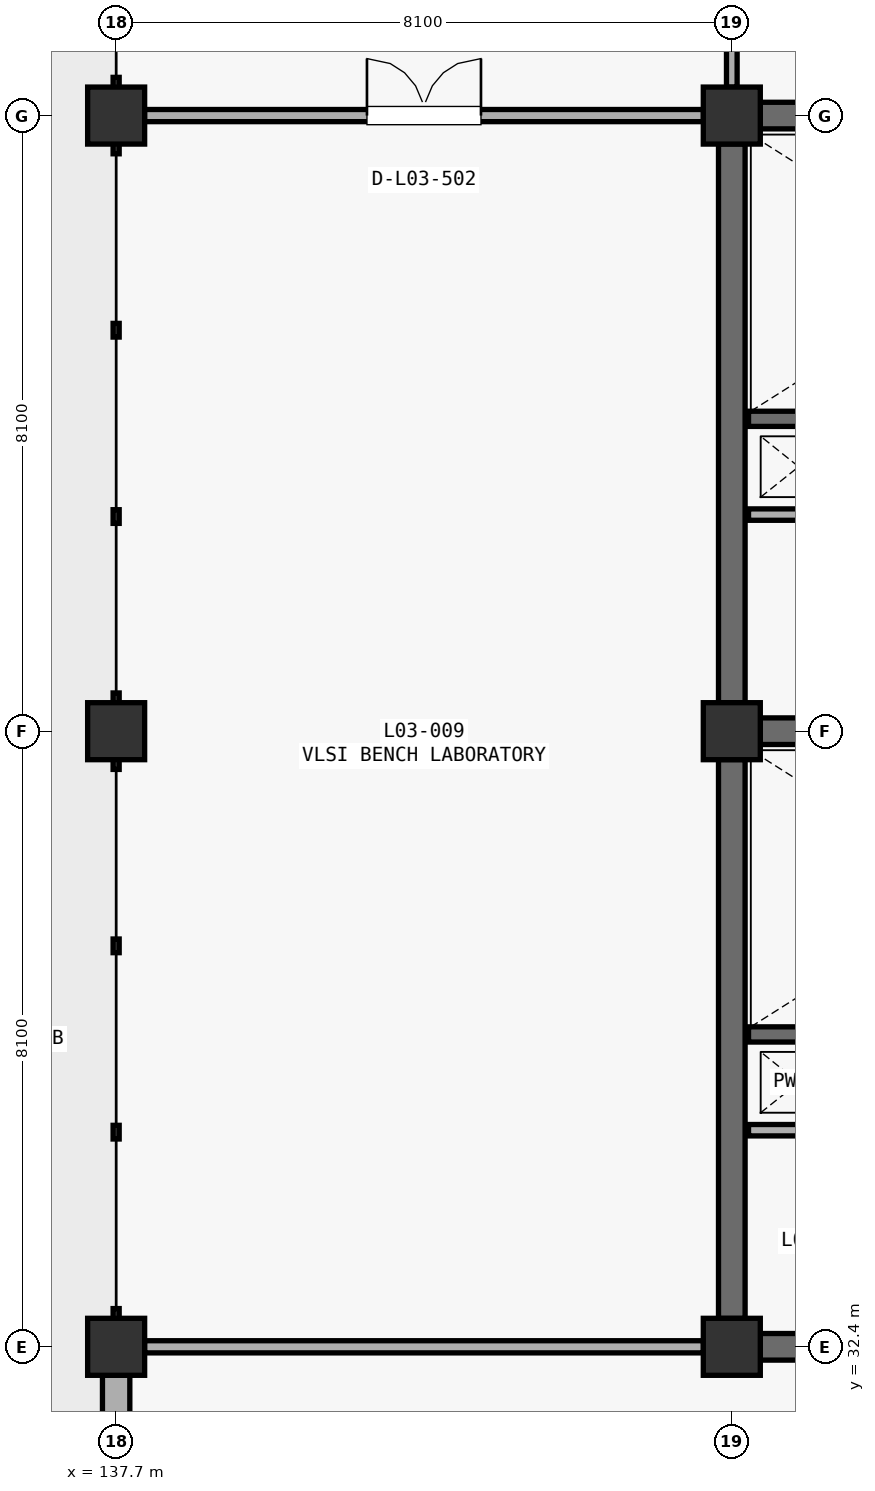
"""IFC4 building model, lengths in metres.
Left out: names, types, materials, properties, quantities, classifications, styles, units other than length and angle.
Written with IfcOpenShell. Run it as: python <this file> out.ifc"""

import sys

from ifc_helpers import new_model, si_unit, direction, frame, frame_2d, origin, origin_2d, place, context, subcontext, project, spatial, rectangle, extrude, element, fill, save


model = new_model("IFC4")
c1 = context("Model", 3, precision=1e-05, world=origin(), true_north=direction((0.0, 1.0)))
c2 = subcontext(c1, "Body", "Model", "MODEL_VIEW")
j1 = project(units=[si_unit("LENGTHUNIT", "METRE"), si_unit("PLANEANGLEUNIT", "RADIAN")], contexts=[c1])
p1 = place(None, origin())
s1 = spatial("IfcSite", under=j1, at=p1, CompositionType="ELEMENT")
p2 = place(p1, origin())
s2 = spatial("IfcBuilding", under=s1, at=p2, CompositionType="ELEMENT")
p3 = place(p2, frame((0.0, 0.0, 14.11)))
s3 = spatial("IfcBuildingStorey", under=s2, at=p3, CompositionType="ELEMENT", Elevation=14.11)
for number, where, z_axis, x_axis in (
    (1, (137.7, 32.4, 0.0), (0.0, 0.0, 1.0), (1.0, 0.0, 0.0)),
    (2, (137.7, 40.5, 0.0), (0.0, 0.0, 1.0), (1.0, 0.0, 0.0)),
    (3, (137.7, 48.6, 0.0), (0.0, 0.0, 1.0), (1.0, 0.0, 0.0)),
    (4, (145.8, 32.4, 0.0), (0.0, 0.0, 1.0), (1.0, 0.0, 0.0)),
    (5, (145.8, 40.5, 0.0), (0.0, 0.0, 1.0), (1.0, 0.0, 0.0)),
    (6, (145.8, 48.6, 0.0), (0.0, 0.0, 1.0), (1.0, 0.0, 0.0)),
):
    element("IfcColumn", number, at=place(p3, frame(where, z_axis=z_axis, x_axis=x_axis)), inside=s3, PredefinedType="COLUMN", context=c2, shape_type="SweptSolid", body=[
        extrude(rectangle(XDim=0.75, YDim=0.75, at=origin_2d()), origin(), (0.0, 0.0, 1.0), 4.42),
    ])
p4 = place(p3, frame((137.7, 24.673, 0.0), z_axis=(0.0, 0.0, 1.0), x_axis=(0.0, 1.0, 0.0)))
e7 = element("IfcWall", 7, at=p4, inside=s3, PredefinedType="STANDARD", context=c2, shape_type="SweptSolid", body=[
    extrude(rectangle(XDim=7.354, YDim=0.36, at=frame_2d((3.677, 0.0))), origin(), (0.0, 0.0, 1.0), 3.512),
])
p5 = place(p4, frame((2.777, 0.0, 0.0)))
e8 = element("IfcOpeningElement", 8, at=p5, cuts=e7, PredefinedType="OPENING", context=c2, shape_type="SweptSolid", body=[
    extrude(rectangle(XDim=1.8, YDim=2.2, at=frame_2d((0.9, 1.1))), frame((0.0, 0.19, 0.0), z_axis=(0.0, -1.0, 0.0), x_axis=(1.0, 0.0, 0.0)), (0.0, 0.0, 1.0), 0.38),
])
for number, where, z_axis, x_axis in (
    (9, (146.173, 40.5, 0.0), (0.0, 0.0, 1.0), (1.0, 0.0, 0.0)),
    (10, (145.8, 32.773, 0.0), (0.0, 0.0, 1.0), (0.0, 1.0, 0.0)),
    (11, (146.173, 32.4, 0.0), (0.0, 0.0, 1.0), (1.0, 0.0, 0.0)),
):
    element("IfcWall", number, at=place(p3, frame(where, z_axis=z_axis, x_axis=x_axis)), inside=s3, PredefinedType="SHEAR", context=c2, shape_type="SweptSolid", body=[
        extrude(rectangle(XDim=7.354, YDim=0.35, at=frame_2d((3.677, 0.0))), origin(), (0.0, 0.0, 1.0), 4.162),
    ])
p6 = place(p3, frame((146.02, 36.51, 0.0), z_axis=(0.0, 0.0, 1.0), x_axis=(1.0, 0.0, 0.0)))
e12 = element("IfcWall", 12, at=p6, inside=s3, PredefinedType="SHEAR", context=c2, shape_type="SweptSolid", body=[
    extrude(rectangle(XDim=7.66, YDim=0.2, at=frame_2d((3.83, 0.0))), origin(), (0.0, 0.0, 1.0), 4.162),
])
p7 = place(p6, frame((6.11, 0.0, 0.0)))
e13 = element("IfcOpeningElement", 13, at=p7, cuts=e12, PredefinedType="OPENING", context=c2, shape_type="SweptSolid", body=[
    extrude(rectangle(XDim=1.15, YDim=2.2, at=frame_2d((0.575, 1.1))), frame((0.0, 0.11, 0.0), z_axis=(0.0, -1.0, 0.0), x_axis=(1.0, 0.0, 0.0)), (0.0, 0.0, 1.0), 0.22),
])
p8 = place(p3, frame((146.02, 35.25, 0.0), z_axis=(0.0, 0.0, 1.0), x_axis=(1.0, 0.0, 0.0)))
e14 = element("IfcWall", 14, at=p8, inside=s3, PredefinedType="PARTITIONING", context=c2, shape_type="SweptSolid", body=[
    extrude(rectangle(XDim=2.53, YDim=0.15, at=frame_2d((1.265, 0.0))), origin(), (0.0, 0.0, 1.0), 4.162),
])
for number, where, z_axis, x_axis in (
    (15, (146.173, 48.6, 0.0), (0.0, 0.0, 1.0), (1.0, 0.0, 0.0)),
    (16, (145.8, 40.873, 0.0), (0.0, 0.0, 1.0), (0.0, 1.0, 0.0)),
):
    element("IfcWall", number, at=place(p3, frame(where, z_axis=z_axis, x_axis=x_axis)), inside=s3, PredefinedType="SHEAR", context=c2, shape_type="SweptSolid", body=[
        extrude(rectangle(XDim=7.354, YDim=0.35, at=frame_2d((3.677, 0.0))), origin(), (0.0, 0.0, 1.0), 4.162),
    ])
p9 = place(p3, frame((146.02, 44.61, 0.0), z_axis=(0.0, 0.0, 1.0), x_axis=(1.0, 0.0, 0.0)))
e17 = element("IfcWall", 17, at=p9, inside=s3, PredefinedType="SHEAR", context=c2, shape_type="SweptSolid", body=[
    extrude(rectangle(XDim=7.66, YDim=0.2, at=frame_2d((3.83, 0.0))), origin(), (0.0, 0.0, 1.0), 4.162),
])
p10 = place(p9, frame((6.11, 0.0, 0.0)))
e18 = element("IfcOpeningElement", 18, at=p10, cuts=e17, PredefinedType="OPENING", context=c2, shape_type="SweptSolid", body=[
    extrude(rectangle(XDim=1.15, YDim=2.2, at=frame_2d((0.575, 1.1))), frame((0.0, 0.11, 0.0), z_axis=(0.0, -1.0, 0.0), x_axis=(1.0, 0.0, 0.0)), (0.0, 0.0, 1.0), 0.22),
])
p11 = place(p3, frame((146.02, 43.35, 0.0), z_axis=(0.0, 0.0, 1.0), x_axis=(1.0, 0.0, 0.0)))
e19 = element("IfcWall", 19, at=p11, inside=s3, PredefinedType="PARTITIONING", context=c2, shape_type="SweptSolid", body=[
    extrude(rectangle(XDim=2.53, YDim=0.15, at=frame_2d((1.265, 0.0))), origin(), (0.0, 0.0, 1.0), 4.162),
])
p12 = place(p3, frame((145.8, 48.973, 0.0), z_axis=(0.0, 0.0, 1.0), x_axis=(0.0, 1.0, 0.0)))
e20 = element("IfcWall", 20, at=p12, inside=s3, PredefinedType="PARTITIONING", context=c2, shape_type="SweptSolid", body=[
    extrude(rectangle(XDim=7.354, YDim=0.14, at=frame_2d((3.677, 0.0))), origin(), (0.0, 0.0, 1.0), 3.51),
])
p13 = place(p3, frame((138.073, 32.4, 0.0), z_axis=(0.0, 0.0, 1.0), x_axis=(1.0, 0.0, 0.0)))
e21 = element("IfcWall", 21, at=p13, inside=s3, PredefinedType="PARTITIONING", context=c2, shape_type="SweptSolid", body=[
    extrude(rectangle(XDim=7.354, YDim=0.16, at=frame_2d((3.677, 0.0))), origin(), (0.0, 0.0, 1.0), 3.412),
])
p14 = place(p3, frame((138.073, 48.6, 0.0), z_axis=(0.0, 0.0, 1.0), x_axis=(1.0, 0.0, 0.0)))
e22 = element("IfcWall", 22, at=p14, inside=s3, PredefinedType="PARTITIONING", context=c2, shape_type="SweptSolid", body=[
    extrude(rectangle(XDim=7.354, YDim=0.16, at=frame_2d((3.677, 0.0))), origin(), (0.0, 0.0, 1.0), 3.562),
])
p15 = place(p14, frame((2.927, 0.0, 0.0)))
e23 = element("IfcOpeningElement", 23, at=p15, cuts=e22, PredefinedType="OPENING", context=c2, shape_type="SweptSolid", body=[
    extrude(rectangle(XDim=1.5, YDim=2.2, at=frame_2d((0.75, 1.1))), frame((0.0, 0.09, 0.0), z_axis=(0.0, -1.0, 0.0), x_axis=(1.0, 0.0, 0.0)), (0.0, 0.0, 1.0), 0.18),
])
p16 = place(p15, origin())
e24 = element("IfcDoor", 24, at=p16, inside=s3, OperationType="DOUBLE_SWING_LEFT", PredefinedType="DOOR", context=c2, shape_type="SweptSolid", body=[
    extrude(rectangle(XDim=1.5, YDim=2.2, at=frame_2d((0.75, 1.1))), frame((0.0, 0.025, 0.0), z_axis=(0.0, -1.0, 0.0), x_axis=(1.0, 0.0, 0.0)), (0.0, 0.0, 1.0), 0.05),
])
fill(e23, e24)
save(model, sys.argv[1])
